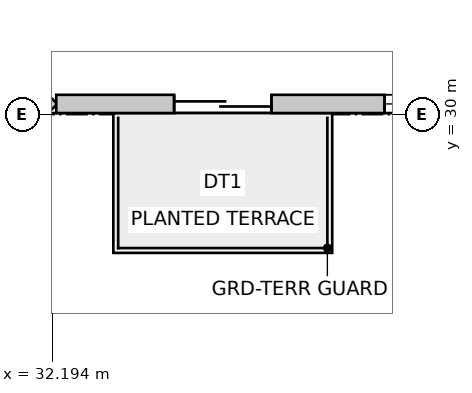
"""IFC4 building model, lengths in metres.
Left out: names, types, materials, properties, quantities, classifications, styles, units other than length and angle.
Written with IfcOpenShell. Run it as: python <this file> out.ifc"""

import sys

from ifc_helpers import new_model, si_unit, direction, frame, frame_2d, origin, place, context, subcontext, project, spatial, rectangle, extrude, source, transform, mapped, element, fill, save


model = new_model("IFC4")
c1 = context("Model", 3, precision=1e-05, world=origin(), true_north=direction((0.0, 1.0)))
c2 = subcontext(c1, "Body", "Model", "MODEL_VIEW")
j1 = project(units=[si_unit("LENGTHUNIT", "METRE"), si_unit("PLANEANGLEUNIT", "RADIAN")], contexts=[c1])
p1 = place(None, origin())
s1 = spatial("IfcSite", under=j1, at=p1, CompositionType="ELEMENT")
p2 = place(p1, origin())
s2 = spatial("IfcBuilding", under=s1, at=p2, CompositionType="ELEMENT")
p3 = place(p2, frame((0.0, 0.0, 87.0)))
s3 = spatial("IfcBuildingStorey", under=s2, at=p3, CompositionType="ELEMENT", Elevation=87.0)
p4 = place(p3, frame((30.116, 28.228, 0.0), z_axis=(0.0, 0.0, 1.0), x_axis=(0.707064797706, 0.707148762175, 0.0)))
e1 = element("IfcWall", 1, at=p4, inside=s3, PredefinedType="SOLIDWALL", context=c2, shape_type="SweptSolid", body=[
    extrude(rectangle(XDim=2.908, YDim=0.3, at=frame_2d((1.454, 0.0))), origin(), (0.0, 0.0, 1.0), 3.75),
])
m1 = source(origin(), c2, "Body", "SweptSolid", [
    extrude(rectangle(XDim=2.1, YDim=2.0, at=frame_2d((1.05, 1.0))), frame((0.0, 0.16, 0.0), z_axis=(0.0, -1.0, 0.0), x_axis=(1.0, 0.0, 0.0)), (0.0, 0.0, 1.0), 0.32),
])
p5 = place(p4, frame((0.404, 0.0, 0.85)))
e2 = element("IfcOpeningElement", 2, at=p5, cuts=e1, PredefinedType="OPENING", context=c2, shape_type="MappedRepresentation", body=[
    mapped(m1, transform((0.0, 0.0, 0.0), scale=1.0)),
])
p6 = place(p3, frame((32.261, 30.178, 0.0), z_axis=(0.0, 0.0, 1.0), x_axis=(1.0, 0.0, 0.0)))
e3 = element("IfcWall", 3, at=p6, inside=s3, PredefinedType="SOLIDWALL", context=c2, shape_type="SweptSolid", body=[
    extrude(rectangle(XDim=20.827, YDim=0.3, at=frame_2d((10.414, 0.0))), origin(), (0.0, 0.0, 1.0), 3.75),
])
m2 = source(origin(), c2, "Body", "SweptSolid", [
    extrude(rectangle(XDim=1.6, YDim=2.15, at=frame_2d((0.8, 1.075))), frame((0.0, 0.16, 0.0), z_axis=(0.0, -1.0, 0.0), x_axis=(1.0, 0.0, 0.0)), (0.0, 0.0, 1.0), 0.32),
])
p7 = place(p6, frame((1.939, 0.0, 0.0)))
e4 = element("IfcOpeningElement", 4, at=p7, cuts=e3, PredefinedType="OPENING", context=c2, shape_type="MappedRepresentation", body=[
    mapped(m2, transform((0.0, 0.0, 0.0), scale=1.0)),
])
m3 = source(origin(), c2, "Body", "SweptSolid", [
    extrude(rectangle(XDim=2.4, YDim=2.2, at=frame_2d((1.2, 1.1))), frame((0.0, 0.16, 0.0), z_axis=(0.0, -1.0, 0.0), x_axis=(1.0, 0.0, 0.0)), (0.0, 0.0, 1.0), 0.32),
])
p8 = place(p6, frame((5.4, 0.0, 0.85)))
e5 = element("IfcOpeningElement", 5, at=p8, cuts=e3, PredefinedType="OPENING", context=c2, shape_type="MappedRepresentation", body=[
    mapped(m3, transform((0.0, 0.0, 0.0), scale=1.0)),
])
m4 = source(origin(), c2, "Body", "SweptSolid", [
    extrude(rectangle(XDim=2.8, YDim=2.4, at=frame_2d((1.4, 1.2))), frame((0.0, 0.16, 0.0), z_axis=(0.0, -1.0, 0.0), x_axis=(1.0, 0.0, 0.0)), (0.0, 0.0, 1.0), 0.32),
])
p9 = place(p6, frame((10.763, 0.0, 0.85)))
e6 = element("IfcOpeningElement", 6, at=p9, cuts=e3, PredefinedType="OPENING", context=c2, shape_type="MappedRepresentation", body=[
    mapped(m4, transform((0.0, 0.0, 0.0), scale=1.0)),
])
p10 = place(p6, frame((16.526, 0.0, 0.85)))
e7 = element("IfcOpeningElement", 7, at=p10, cuts=e3, PredefinedType="OPENING", context=c2, shape_type="MappedRepresentation", body=[
    mapped(m3, transform((0.0, 0.0, 0.0), scale=1.0)),
])
m5 = source(origin(), c2, "Body", "SweptSolid", [
    extrude(rectangle(XDim=1.6, YDim=2.15, at=frame_2d((0.8, 1.075))), frame((0.0, 0.025, 0.0), z_axis=(0.0, -1.0, 0.0), x_axis=(1.0, 0.0, 0.0)), (0.0, 0.0, 1.0), 0.05),
])
p11 = place(p7, origin())
e8 = element("IfcDoor", 8, at=p11, inside=s3, OperationType="DOUBLE_DOOR_SLIDING", PredefinedType="DOOR", context=c2, shape_type="MappedRepresentation", body=[
    mapped(m5, transform((0.0, 0.0, 0.0), scale=1.0)),
])
fill(e4, e8)
m6 = source(origin(), c2, "Body", "SweptSolid", [
    extrude(rectangle(XDim=2.4, YDim=2.2, at=frame_2d((1.2, 1.1))), frame((0.0, -0.015, 0.0), z_axis=(0.0, -1.0, 0.0), x_axis=(1.0, 0.0, 0.0)), (0.0, 0.0, 1.0), 0.06),
])
p12 = place(p8, origin())
e9 = element("IfcWindow", 9, at=p12, inside=s3, PartitioningType="SINGLE_PANEL", PredefinedType="WINDOW", context=c2, shape_type="MappedRepresentation", body=[
    mapped(m6, transform((0.0, 0.0, 0.0), scale=1.0)),
])
fill(e5, e9)
save(model, sys.argv[1])
